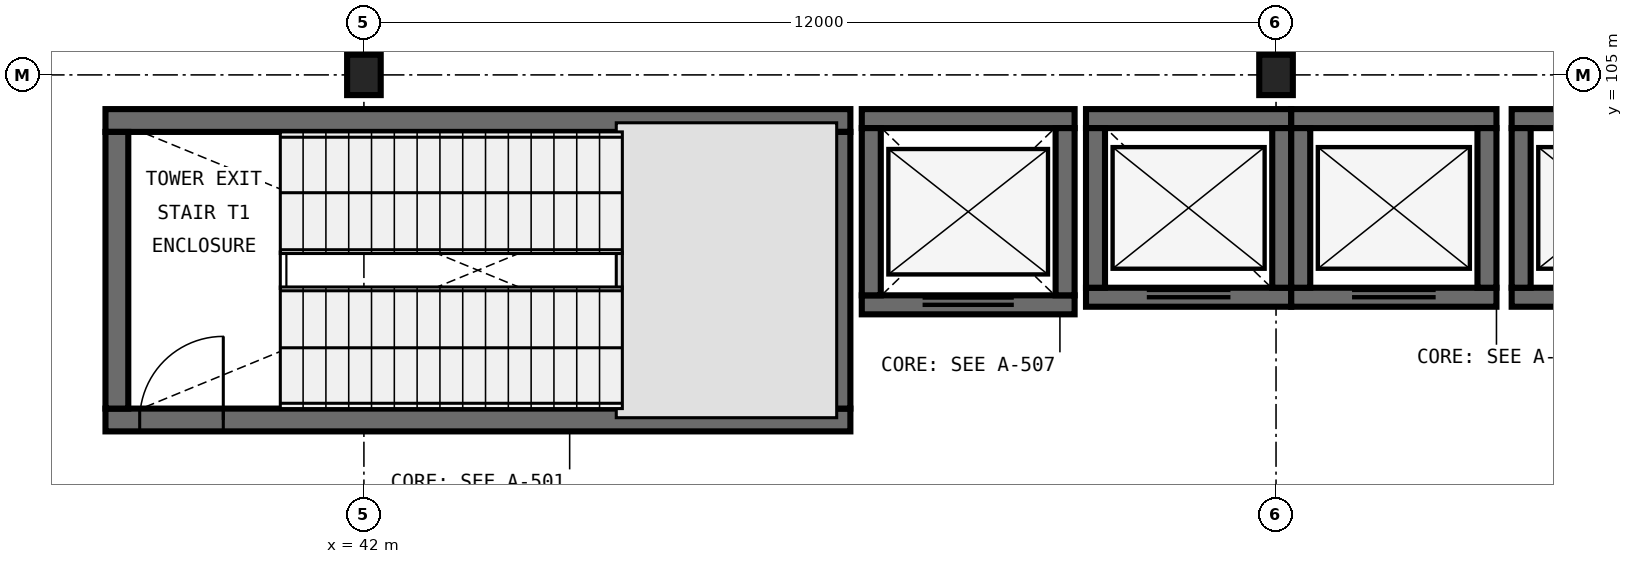
"""IFC4 building model, lengths in metres.
Left out: names, types, materials, properties, quantities, classifications, styles, units other than length and angle.
Written with IfcOpenShell. Run it as: python <this file> out.ifc"""

import sys

from ifc_helpers import new_model, si_unit, direction, frame, frame_2d, origin, origin_2d, place, context, subcontext, project, spatial, rectangle, i_section, extrude, element, fill, save


model = new_model("IFC4")
c1 = context("Model", 3, precision=1e-05, world=origin(), true_north=direction((0.0, 1.0)))
c2 = subcontext(c1, "Body", "Model", "MODEL_VIEW")
j1 = project(units=[si_unit("LENGTHUNIT", "METRE"), si_unit("PLANEANGLEUNIT", "RADIAN")], contexts=[c1])
p1 = place(None, origin())
s1 = spatial("IfcSite", under=j1, at=p1, CompositionType="ELEMENT")
p2 = place(p1, origin())
s2 = spatial("IfcBuilding", under=s1, at=p2, CompositionType="ELEMENT")
p3 = place(p2, frame((0.0, 0.0, 18.0)))
s3 = spatial("IfcBuildingStorey", under=s2, at=p3, CompositionType="ELEMENT", Elevation=18.0)
for number, where, z_axis, x_axis in (
    (1, (42.0, 105.0, 0.0), (0.0, 0.0, 1.0), (1.0, 0.0, 0.0)),
    (2, (54.0, 105.0, 0.0), (0.0, 0.0, 1.0), (1.0, 0.0, 0.0)),
):
    element("IfcColumn", number, at=place(p3, frame(where, z_axis=z_axis, x_axis=x_axis)), inside=s3, PredefinedType="COLUMN", context=c2, shape_type="SweptSolid", body=[
        extrude(i_section(OverallWidth=0.442, OverallDepth=0.531, WebThickness=0.066, FlangeThickness=0.106, FilletRadius=0.031, at=origin_2d()), origin(), (0.0, 0.0, 1.0), 5.4),
    ])
p4 = place(p3, frame((38.6, 100.46, 0.0), z_axis=(0.0, 0.0, 1.0), x_axis=(1.0, 0.0, 0.0)))
e3 = element("IfcWall", 3, at=p4, inside=s3, PredefinedType="SHEAR", context=c2, shape_type="SweptSolid", body=[
    extrude(rectangle(XDim=9.8, YDim=0.3, at=frame_2d((4.9, 0.0))), origin(), (0.0, 0.0, 1.0), 5.4),
])
p5 = place(p4, frame((0.45, 0.0, 0.0)))
e4 = element("IfcOpeningElement", 4, at=p5, cuts=e3, PredefinedType="OPENING", context=c2, shape_type="SweptSolid", body=[
    extrude(rectangle(XDim=1.1, YDim=2.2, at=frame_2d((0.55, 1.1))), frame((0.0, 0.165, 0.0), z_axis=(0.0, -1.0, 0.0), x_axis=(1.0, 0.0, 0.0)), (0.0, 0.0, 1.0), 0.33),
])
p6 = place(p3, frame((48.4, 104.4, 0.0), z_axis=(0.0, 0.0, 1.0), x_axis=(-1.0, 0.0, 0.0)))
e5 = element("IfcWall", 5, at=p6, inside=s3, PredefinedType="SHEAR", context=c2, shape_type="SweptSolid", body=[
    extrude(rectangle(XDim=9.8, YDim=0.3, at=frame_2d((4.9, 0.0))), origin(), (0.0, 0.0, 1.0), 5.4),
])
for number, where, z_axis, x_axis in (
    (6, (38.75, 104.25, 0.0), (0.0, 0.0, 1.0), (0.0, -1.0, 0.0)),
    (7, (48.25, 100.61, 0.0), (0.0, 0.0, 1.0), (0.0, 1.0, 0.0)),
):
    element("IfcWall", number, at=place(p3, frame(where, z_axis=z_axis, x_axis=x_axis)), inside=s3, PredefinedType="SHEAR", context=c2, shape_type="SweptSolid", body=[
        extrude(rectangle(XDim=3.64, YDim=0.3, at=frame_2d((1.82, 0.0))), origin(), (0.0, 0.0, 1.0), 5.4),
    ])
p7 = place(p3, frame((48.55, 101.975, 0.0), z_axis=(0.0, 0.0, 1.0), x_axis=(1.0, 0.0, 0.0)))
e8 = element("IfcWall", 8, at=p7, inside=s3, PredefinedType="SHEAR", context=c2, shape_type="SweptSolid", body=[
    extrude(rectangle(XDim=2.8, YDim=0.25, at=frame_2d((1.4, 0.0))), origin(), (0.0, 0.0, 1.0), 5.4),
])
p8 = place(p7, frame((0.8, 0.0, 0.0)))
e9 = element("IfcOpeningElement", 9, at=p8, cuts=e8, PredefinedType="OPENING", context=c2, shape_type="SweptSolid", body=[
    extrude(rectangle(XDim=1.2, YDim=2.2, at=frame_2d((0.6, 1.1))), frame((0.0, 0.14, 0.0), z_axis=(0.0, -1.0, 0.0), x_axis=(1.0, 0.0, 0.0)), (0.0, 0.0, 1.0), 0.28),
])
p9 = place(p3, frame((51.35, 104.425, 0.0), z_axis=(0.0, 0.0, 1.0), x_axis=(-1.0, 0.0, 0.0)))
e10 = element("IfcWall", 10, at=p9, inside=s3, PredefinedType="SHEAR", context=c2, shape_type="SweptSolid", body=[
    extrude(rectangle(XDim=2.8, YDim=0.25, at=frame_2d((1.4, 0.0))), origin(), (0.0, 0.0, 1.0), 5.4),
])
for number, where, z_axis, x_axis in (
    (11, (48.675, 104.3, 0.0), (0.0, 0.0, 1.0), (0.0, -1.0, 0.0)),
    (12, (51.225, 102.1, 0.0), (0.0, 0.0, 1.0), (0.0, 1.0, 0.0)),
):
    element("IfcWall", number, at=place(p3, frame(where, z_axis=z_axis, x_axis=x_axis)), inside=s3, PredefinedType="SHEAR", context=c2, shape_type="SweptSolid", body=[
        extrude(rectangle(XDim=2.2, YDim=0.25, at=frame_2d((1.1, 0.0))), origin(), (0.0, 0.0, 1.0), 5.4),
    ])
p10 = place(p3, frame((51.5, 102.075, 0.0), z_axis=(0.0, 0.0, 1.0), x_axis=(1.0, 0.0, 0.0)))
e13 = element("IfcWall", 13, at=p10, inside=s3, PredefinedType="SHEAR", context=c2, shape_type="SweptSolid", body=[
    extrude(rectangle(XDim=2.7, YDim=0.25, at=frame_2d((1.35, 0.0))), origin(), (0.0, 0.0, 1.0), 5.4),
])
p11 = place(p10, frame((0.8, 0.0, 0.0)))
e14 = element("IfcOpeningElement", 14, at=p11, cuts=e13, PredefinedType="OPENING", context=c2, shape_type="SweptSolid", body=[
    extrude(rectangle(XDim=1.1, YDim=2.2, at=frame_2d((0.55, 1.1))), frame((0.0, 0.14, 0.0), z_axis=(0.0, -1.0, 0.0), x_axis=(1.0, 0.0, 0.0)), (0.0, 0.0, 1.0), 0.28),
])
p12 = place(p3, frame((54.2, 104.425, 0.0), z_axis=(0.0, 0.0, 1.0), x_axis=(-1.0, 0.0, 0.0)))
e15 = element("IfcWall", 15, at=p12, inside=s3, PredefinedType="SHEAR", context=c2, shape_type="SweptSolid", body=[
    extrude(rectangle(XDim=2.7, YDim=0.25, at=frame_2d((1.35, 0.0))), origin(), (0.0, 0.0, 1.0), 5.4),
])
for number, where, z_axis, x_axis in (
    (16, (51.625, 104.3, 0.0), (0.0, 0.0, 1.0), (0.0, -1.0, 0.0)),
    (17, (54.075, 102.2, 0.0), (0.0, 0.0, 1.0), (0.0, 1.0, 0.0)),
):
    element("IfcWall", number, at=place(p3, frame(where, z_axis=z_axis, x_axis=x_axis)), inside=s3, PredefinedType="SHEAR", context=c2, shape_type="SweptSolid", body=[
        extrude(rectangle(XDim=2.1, YDim=0.25, at=frame_2d((1.05, 0.0))), origin(), (0.0, 0.0, 1.0), 5.4),
    ])
p13 = place(p3, frame((54.2, 102.075, 0.0), z_axis=(0.0, 0.0, 1.0), x_axis=(1.0, 0.0, 0.0)))
e18 = element("IfcWall", 18, at=p13, inside=s3, PredefinedType="SHEAR", context=c2, shape_type="SweptSolid", body=[
    extrude(rectangle(XDim=2.7, YDim=0.25, at=frame_2d((1.35, 0.0))), origin(), (0.0, 0.0, 1.0), 5.4),
])
p14 = place(p13, frame((0.8, 0.0, 0.0)))
e19 = element("IfcOpeningElement", 19, at=p14, cuts=e18, PredefinedType="OPENING", context=c2, shape_type="SweptSolid", body=[
    extrude(rectangle(XDim=1.1, YDim=2.2, at=frame_2d((0.55, 1.1))), frame((0.0, 0.14, 0.0), z_axis=(0.0, -1.0, 0.0), x_axis=(1.0, 0.0, 0.0)), (0.0, 0.0, 1.0), 0.28),
])
p15 = place(p3, frame((56.9, 104.425, 0.0), z_axis=(0.0, 0.0, 1.0), x_axis=(-1.0, 0.0, 0.0)))
e20 = element("IfcWall", 20, at=p15, inside=s3, PredefinedType="SHEAR", context=c2, shape_type="SweptSolid", body=[
    extrude(rectangle(XDim=2.7, YDim=0.25, at=frame_2d((1.35, 0.0))), origin(), (0.0, 0.0, 1.0), 5.4),
])
for number, where, z_axis, x_axis in (
    (21, (54.325, 104.3, 0.0), (0.0, 0.0, 1.0), (0.0, -1.0, 0.0)),
    (22, (56.775, 102.2, 0.0), (0.0, 0.0, 1.0), (0.0, 1.0, 0.0)),
):
    element("IfcWall", number, at=place(p3, frame(where, z_axis=z_axis, x_axis=x_axis)), inside=s3, PredefinedType="SHEAR", context=c2, shape_type="SweptSolid", body=[
        extrude(rectangle(XDim=2.1, YDim=0.25, at=frame_2d((1.05, 0.0))), origin(), (0.0, 0.0, 1.0), 5.4),
    ])
p16 = place(p3, frame((57.1, 102.075, 0.0), z_axis=(0.0, 0.0, 1.0), x_axis=(1.0, 0.0, 0.0)))
e23 = element("IfcWall", 23, at=p16, inside=s3, PredefinedType="SHEAR", context=c2, shape_type="SweptSolid", body=[
    extrude(rectangle(XDim=2.7, YDim=0.25, at=frame_2d((1.35, 0.0))), origin(), (0.0, 0.0, 1.0), 5.4),
])
p17 = place(p16, frame((0.8, 0.0, 0.0)))
e24 = element("IfcOpeningElement", 24, at=p17, cuts=e23, PredefinedType="OPENING", context=c2, shape_type="SweptSolid", body=[
    extrude(rectangle(XDim=1.1, YDim=2.2, at=frame_2d((0.55, 1.1))), frame((0.0, 0.14, 0.0), z_axis=(0.0, -1.0, 0.0), x_axis=(1.0, 0.0, 0.0)), (0.0, 0.0, 1.0), 0.28),
])
p18 = place(p3, frame((59.8, 104.425, 0.0), z_axis=(0.0, 0.0, 1.0), x_axis=(-1.0, 0.0, 0.0)))
e25 = element("IfcWall", 25, at=p18, inside=s3, PredefinedType="SHEAR", context=c2, shape_type="SweptSolid", body=[
    extrude(rectangle(XDim=2.7, YDim=0.25, at=frame_2d((1.35, 0.0))), origin(), (0.0, 0.0, 1.0), 5.4),
])
p19 = place(p3, frame((57.225, 104.3, 0.0), z_axis=(0.0, 0.0, 1.0), x_axis=(0.0, -1.0, 0.0)))
e26 = element("IfcWall", 26, at=p19, inside=s3, PredefinedType="SHEAR", context=c2, shape_type="SweptSolid", body=[
    extrude(rectangle(XDim=2.1, YDim=0.25, at=frame_2d((1.05, 0.0))), origin(), (0.0, 0.0, 1.0), 5.4),
])
p20 = place(p5, origin())
e27 = element("IfcDoor", 27, at=p20, inside=s3, OperationType="SINGLE_SWING_RIGHT", PredefinedType="DOOR", context=c2, shape_type="SweptSolid", body=[
    extrude(rectangle(XDim=1.1, YDim=2.2, at=frame_2d((0.55, 1.1))), frame((0.0, 0.025, 0.0), z_axis=(0.0, -1.0, 0.0), x_axis=(1.0, 0.0, 0.0)), (0.0, 0.0, 1.0), 0.05),
])
fill(e4, e27)
p21 = place(p8, origin())
e28 = element("IfcDoor", 28, at=p21, inside=s3, OperationType="DOUBLE_DOOR_SLIDING", PredefinedType="DOOR", context=c2, shape_type="SweptSolid", body=[
    extrude(rectangle(XDim=1.2, YDim=2.2, at=frame_2d((0.6, 1.1))), frame((0.0, 0.025, 0.0), z_axis=(0.0, -1.0, 0.0), x_axis=(1.0, 0.0, 0.0)), (0.0, 0.0, 1.0), 0.05),
])
fill(e9, e28)
p22 = place(p11, origin())
e29 = element("IfcDoor", 29, at=p22, inside=s3, OperationType="DOUBLE_DOOR_SLIDING", PredefinedType="DOOR", context=c2, shape_type="SweptSolid", body=[
    extrude(rectangle(XDim=1.1, YDim=2.2, at=frame_2d((0.55, 1.1))), frame((0.0, 0.025, 0.0), z_axis=(0.0, -1.0, 0.0), x_axis=(1.0, 0.0, 0.0)), (0.0, 0.0, 1.0), 0.05),
])
fill(e14, e29)
p23 = place(p14, origin())
e30 = element("IfcDoor", 30, at=p23, inside=s3, OperationType="DOUBLE_DOOR_SLIDING", PredefinedType="DOOR", context=c2, shape_type="SweptSolid", body=[
    extrude(rectangle(XDim=1.1, YDim=2.2, at=frame_2d((0.55, 1.1))), frame((0.0, 0.025, 0.0), z_axis=(0.0, -1.0, 0.0), x_axis=(1.0, 0.0, 0.0)), (0.0, 0.0, 1.0), 0.05),
])
fill(e19, e30)
save(model, sys.argv[1])
